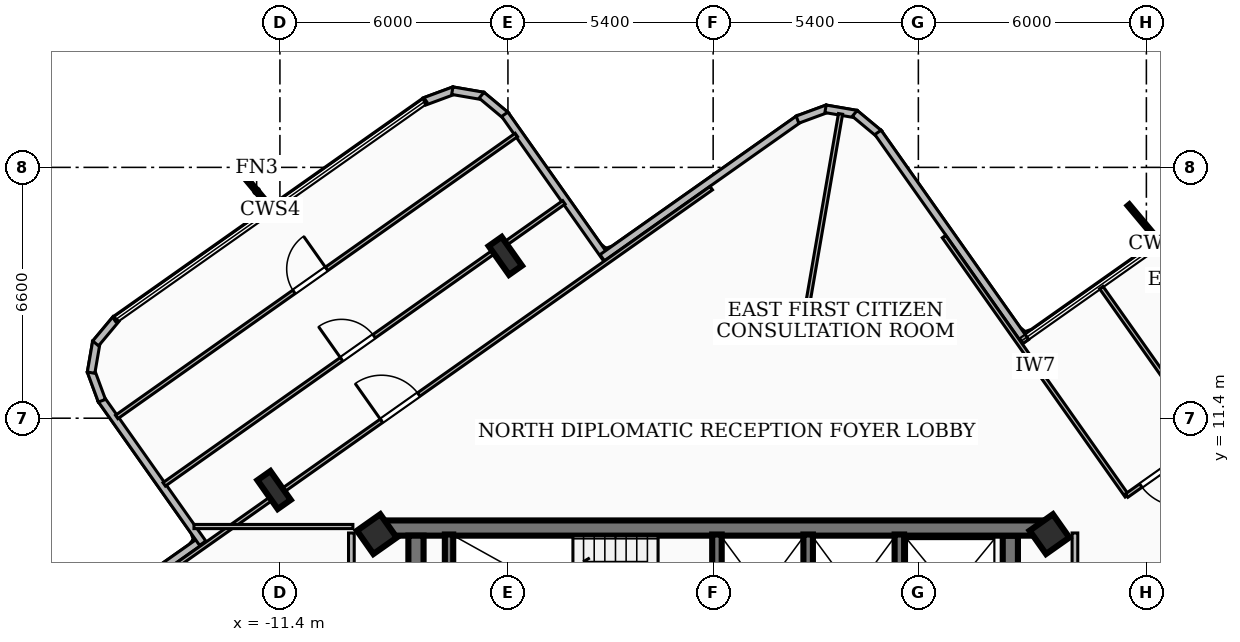
"""IFC4 building model, lengths in metres.
Left out: names, types, materials, properties, quantities, classifications, styles, units other than length and angle.
Written with IfcOpenShell. Run it as: python <this file> out.ifc"""

import sys

from ifc_helpers import new_model, si_unit, direction, frame, frame_2d, origin, origin_2d, place, context, subcontext, project, spatial, rectangle, i_section, extrude, element, fill, save


model = new_model("IFC4")
c1 = context("Model", 3, precision=1e-05, world=origin(), true_north=direction((0.0, 1.0)))
c2 = subcontext(c1, "Body", "Model", "MODEL_VIEW")
j1 = project(units=[si_unit("LENGTHUNIT", "METRE"), si_unit("PLANEANGLEUNIT", "RADIAN")], contexts=[c1])
p1 = place(None, origin())
s1 = spatial("IfcSite", under=j1, at=p1, CompositionType="ELEMENT")
p2 = place(p1, origin())
s2 = spatial("IfcBuilding", under=s1, at=p2, CompositionType="ELEMENT")
p3 = place(p2, frame((0.0, 0.0, 225.72)))
s3 = spatial("IfcBuildingStorey", under=s2, at=p3, CompositionType="ELEMENT", Elevation=225.72)
p4 = place(p3, frame((-8.78, 8.51, 0.0), z_axis=(0.0, 0.0, 1.0), x_axis=(1.0, 0.0, 0.0)))
e1 = element("IfcWall", 1, at=p4, inside=s3, PredefinedType="SHEAR", context=c2, shape_type="SweptSolid", body=[
    extrude(rectangle(XDim=17.56, YDim=0.4, at=frame_2d((8.78, 0.0))), origin(), (0.0, 0.0, 1.0), 3.14),
])
for number, where, z_axis, x_axis in (
    (2, (-7.82, 1.95, 0.0), (0.0, 0.0, 1.0), (0.0, 1.0, 0.0)),
    (3, (7.82, 8.31, 0.0), (0.0, 0.0, 1.0), (0.0, -1.0, 0.0)),
):
    element("IfcWall", number, at=place(p3, frame(where, z_axis=z_axis, x_axis=x_axis)), inside=s3, PredefinedType="SHEAR", context=c2, shape_type="SweptSolid", body=[
        extrude(rectangle(XDim=6.36, YDim=0.4, at=frame_2d((3.18, 0.0))), origin(), (0.0, 0.0, 1.0), 3.14),
    ])
p5 = place(p3, frame((-6.95, 5.28, 0.0), z_axis=(0.0, 0.0, 1.0), x_axis=(0.0, 1.0, 0.0)))
e4 = element("IfcWall", 4, at=p5, inside=s3, PredefinedType="SOLIDWALL", context=c2, shape_type="SweptSolid", body=[
    extrude(rectangle(XDim=3.06, YDim=0.22, at=frame_2d((1.53, 0.0))), origin(), (0.0, 0.0, 1.0), 3.14),
])
for number, where, z_axis, x_axis in (
    (5, (0.1, 5.3, 0.0), (0.0, 0.0, 1.0), (0.0, 1.0, 0.0)),
    (6, (2.5, 5.3, 0.0), (0.0, 0.0, 1.0), (0.0, 1.0, 0.0)),
    (7, (4.9, 5.3, 0.0), (0.0, 0.0, 1.0), (0.0, 1.0, 0.0)),
):
    element("IfcWall", number, at=place(p3, frame(where, z_axis=z_axis, x_axis=x_axis)), inside=s3, PredefinedType="SOLIDWALL", context=c2, shape_type="SweptSolid", body=[
        extrude(rectangle(XDim=3.04, YDim=0.25, at=frame_2d((1.52, 0.0))), origin(), (0.0, 0.0, 1.0), 3.14),
    ])
for number, where, z_axis, x_axis in (
    (8, (-8.85, 8.35, 0.0), (0.0, 0.0, 1.0), (0.817, 0.576, 0.0)),
    (9, (8.85, 8.35, 0.0), (0.0, 0.0, 1.0), (0.817, 0.576, 0.0)),
):
    element("IfcColumn", number, at=place(p3, frame(where, z_axis=z_axis, x_axis=x_axis)), inside=s3, PredefinedType="COLUMN", context=c2, shape_type="SweptSolid", body=[
        extrude(rectangle(XDim=0.75, YDim=0.75, at=origin_2d()), origin(), (0.0, 0.0, 1.0), 3.42),
    ])
for number, where, z_axis, x_axis in (
    (10, (-5.468, 15.671, 0.0), (0.0, 0.0, 1.0), (0.817, 0.576, 0.0)),
    (11, (-11.554, 9.51, 0.0), (0.0, 0.0, 1.0), (0.817, 0.576, 0.0)),
):
    element("IfcColumn", number, at=place(p3, frame(where, z_axis=z_axis, x_axis=x_axis)), inside=s3, PredefinedType="COLUMN", context=c2, shape_type="SweptSolid", body=[
        extrude(i_section(OverallWidth=0.418, OverallDepth=0.927, WebThickness=0.019, FlangeThickness=0.032, at=origin_2d()), origin(), (0.0, 0.0, 1.0), 3.42),
    ])
p6 = place(p3, frame((-18.921, 4.337, 0.0), z_axis=(0.0, 0.0, 1.0), x_axis=(0.817167578816, 0.576400163196, 0.0)))
e12 = element("IfcWall", 12, at=p6, inside=s3, PredefinedType="SOLIDWALL", context=c2, shape_type="SweptSolid", body=[
    extrude(rectangle(XDim=6.74, YDim=0.2, at=frame_2d((3.37, 0.0))), origin(), (0.0, 0.0, 1.0), 3.14),
])
p7 = place(p3, frame((-13.432, 8.111, 0.0), z_axis=(0.0, 0.0, 1.0), x_axis=(-0.576445639344, 0.817135499707, 0.0)))
e13 = element("IfcWall", 13, at=p7, inside=s3, PredefinedType="SOLIDWALL", context=c2, shape_type="SweptSolid", body=[
    extrude(rectangle(XDim=4.641, YDim=0.2, at=frame_2d((2.32, 0.0))), origin(), (0.0, 0.0, 1.0), 3.14),
])
p8 = place(p3, frame((-16.084, 11.86, 0.0), z_axis=(0.0, 0.0, 1.0), x_axis=(-0.346232030844, 0.938148911857, 0.0)))
e14 = element("IfcWall", 14, at=p8, inside=s3, PredefinedType="SOLIDWALL", context=c2, shape_type="SweptSolid", body=[
    extrude(rectangle(XDim=0.838, YDim=0.2, at=frame_2d((0.419, 0.0))), origin(), (0.0, 0.0, 1.0), 3.14),
])
p9 = place(p3, frame((-16.369, 12.598, 0.0), z_axis=(0.0, 0.0, 1.0), x_axis=(0.169332910212, 0.985558910223, 0.0)))
e15 = element("IfcWall", 15, at=p9, inside=s3, PredefinedType="SOLIDWALL", context=c2, shape_type="SweptSolid", body=[
    extrude(rectangle(XDim=0.826, YDim=0.2, at=frame_2d((0.413, 0.0))), origin(), (0.0, 0.0, 1.0), 3.14),
])
p10 = place(p3, frame((-16.249, 13.368, 0.0), z_axis=(0.0, 0.0, 1.0), x_axis=(0.641043819012, 0.76750428149, 0.0)))
e16 = element("IfcWall", 16, at=p10, inside=s3, PredefinedType="SOLIDWALL", context=c2, shape_type="SweptSolid", body=[
    extrude(rectangle(XDim=0.838, YDim=0.2, at=frame_2d((0.419, 0.0))), origin(), (0.0, 0.0, 1.0), 3.14),
])
p11 = place(p3, frame((-7.601, 19.732, 0.0), z_axis=(0.0, 0.0, 1.0), x_axis=(0.937664324164, 0.347542249504, 0.0)))
e17 = element("IfcWall", 17, at=p11, inside=s3, PredefinedType="SOLIDWALL", context=c2, shape_type="SweptSolid", body=[
    extrude(rectangle(XDim=0.837, YDim=0.2, at=frame_2d((0.419, 0.0))), origin(), (0.0, 0.0, 1.0), 3.14),
])
p12 = place(p3, frame((-6.864, 20.018, 0.0), z_axis=(0.0, 0.0, 1.0), x_axis=(0.985501046628, -0.16966934636, 0.0)))
e18 = element("IfcWall", 18, at=p12, inside=s3, PredefinedType="SOLIDWALL", context=c2, shape_type="SweptSolid", body=[
    extrude(rectangle(XDim=0.826, YDim=0.2, at=frame_2d((0.413, 0.0))), origin(), (0.0, 0.0, 1.0), 3.14),
])
p13 = place(p3, frame((-6.094, 19.898, 0.0), z_axis=(0.0, 0.0, 1.0), x_axis=(0.767647650908, -0.640872127694, 0.0)))
e19 = element("IfcWall", 19, at=p13, inside=s3, PredefinedType="SOLIDWALL", context=c2, shape_type="SweptSolid", body=[
    extrude(rectangle(XDim=0.838, YDim=0.2, at=frame_2d((0.419, 0.0))), origin(), (0.0, 0.0, 1.0), 3.14),
])
p14 = place(p3, frame((-5.484, 19.397, 0.0), z_axis=(0.0, 0.0, 1.0), x_axis=(0.576451897958, -0.817131084551, 0.0)))
e20 = element("IfcWall", 20, at=p14, inside=s3, PredefinedType="SOLIDWALL", context=c2, shape_type="SweptSolid", body=[
    extrude(rectangle(XDim=4.642, YDim=0.2, at=frame_2d((2.321, 0.0))), origin(), (0.0, 0.0, 1.0), 3.14),
])
p15 = place(p3, frame((-2.919, 15.623, 0.0), z_axis=(0.0, 0.0, 1.0), x_axis=(0.817050016192, 0.576566796686, 0.0)))
e21 = element("IfcWall", 21, at=p15, inside=s3, PredefinedType="SOLIDWALL", context=c2, shape_type="SweptSolid", body=[
    extrude(rectangle(XDim=6.341, YDim=0.2, at=frame_2d((3.17, 0.0))), origin(), (0.0, 0.0, 1.0), 3.14),
])
p16 = place(p3, frame((2.219, 19.256, 0.0), z_axis=(0.0, 0.0, 1.0), x_axis=(0.938243551417, 0.345975487894, 0.0)))
e22 = element("IfcWall", 22, at=p16, inside=s3, PredefinedType="SOLIDWALL", context=c2, shape_type="SweptSolid", body=[
    extrude(rectangle(XDim=0.838, YDim=0.2, at=frame_2d((0.419, 0.0))), origin(), (0.0, 0.0, 1.0), 3.14),
])
p17 = place(p3, frame((2.957, 19.541, 0.0), z_axis=(0.0, 0.0, 1.0), x_axis=(0.985466949497, -0.169867275979, 0.0)))
e23 = element("IfcWall", 23, at=p17, inside=s3, PredefinedType="SOLIDWALL", context=c2, shape_type="SweptSolid", body=[
    extrude(rectangle(XDim=0.825, YDim=0.2, at=frame_2d((0.413, 0.0))), origin(), (0.0, 0.0, 1.0), 3.14),
])
p18 = place(p3, frame((3.726, 19.421, 0.0), z_axis=(0.0, 0.0, 1.0), x_axis=(0.768698761673, -0.639610986305, 0.0)))
e24 = element("IfcWall", 24, at=p18, inside=s3, PredefinedType="SOLIDWALL", context=c2, shape_type="SweptSolid", body=[
    extrude(rectangle(XDim=0.838, YDim=0.2, at=frame_2d((0.419, 0.0))), origin(), (0.0, 0.0, 1.0), 3.14),
])
p19 = place(p3, frame((4.337, 18.921, 0.0), z_axis=(0.0, 0.0, 1.0), x_axis=(0.576400163196, -0.817167578816, 0.0)))
e25 = element("IfcWall", 25, at=p19, inside=s3, PredefinedType="SOLIDWALL", context=c2, shape_type="SweptSolid", body=[
    extrude(rectangle(XDim=6.74, YDim=0.2, at=frame_2d((3.37, 0.0))), origin(), (0.0, 0.0, 1.0), 3.14),
])
p20 = place(p3, frame((-9.52, 1.75, 0.0), z_axis=(0.0, 0.0, 1.0), x_axis=(0.0, 1.0, 0.0)))
e26 = element("IfcWall", 26, at=p20, inside=s3, PredefinedType="PARTITIONING", context=c2, shape_type="SweptSolid", body=[
    extrude(rectangle(XDim=6.63, YDim=0.15, at=frame_2d((3.315, 0.0))), origin(), (0.0, 0.0, 1.0), 3.14),
])
p21 = place(p3, frame((9.52, 1.75, 0.0), z_axis=(0.0, 0.0, 1.0), x_axis=(0.0, 1.0, 0.0)))
e27 = element("IfcWall", 27, at=p21, inside=s3, PredefinedType="PARTITIONING", context=c2, shape_type="SweptSolid", body=[
    extrude(rectangle(XDim=6.63, YDim=0.15, at=frame_2d((3.315, 0.0))), origin(), (0.0, 0.0, 1.0), 2.51),
])
p22 = place(p3, frame((-13.662, 8.55, 0.0), z_axis=(0.0, 0.0, 1.0), x_axis=(1.0, 0.0, 0.0)))
e28 = element("IfcWall", 28, at=p22, inside=s3, PredefinedType="PARTITIONING", context=c2, shape_type="SweptSolid", body=[
    extrude(rectangle(XDim=4.182, YDim=0.11, at=frame_2d((2.091, 0.0))), origin(), (0.0, 0.0, 1.0), 2.51),
])
p23 = place(p3, frame((2.338, 13.54, 0.0), z_axis=(0.0, 0.0, 1.0), x_axis=(0.1703339471, 0.9853863945, 0.0)))
e29 = element("IfcWall", 29, at=p23, inside=s3, PredefinedType="PARTITIONING", context=c2, shape_type="SweptSolid", body=[
    extrude(rectangle(XDim=5.954, YDim=0.11, at=frame_2d((2.977, 0.0))), origin(), (0.0, 0.0, 1.0), 3.14),
])
p24 = place(p3, frame((10.887, 9.357, 0.0), z_axis=(0.0, 0.0, 1.0), x_axis=(-0.576423728743, 0.817150956031, 0.0)))
e30 = element("IfcWall", 30, at=p24, inside=s3, PredefinedType="PARTITIONING", context=c2, shape_type="SweptSolid", body=[
    extrude(rectangle(XDim=8.35, YDim=0.11, at=frame_2d((4.175, 0.0))), origin(), (0.0, 0.0, 1.0), 2.51),
])
p25 = place(p3, frame((13.014, 10.869, 0.0), z_axis=(0.0, 0.0, 1.0), x_axis=(-0.817133808286, -0.576448036995, 0.0)))
e31 = element("IfcWall", 31, at=p25, inside=s3, PredefinedType="PARTITIONING", context=c2, shape_type="SweptSolid", body=[
    extrude(rectangle(XDim=2.609, YDim=0.11, at=frame_2d((1.304, 0.0))), origin(), (0.0, 0.0, 1.0), 3.14),
])
p26 = place(p25, frame((0.854, 0.0, 0.0)))
e32 = element("IfcOpeningElement", 32, at=p26, cuts=e31, PredefinedType="OPENING", context=c2, shape_type="SweptSolid", body=[
    extrude(rectangle(XDim=1.3, YDim=2.1, at=frame_2d((0.65, 1.05))), frame((0.0, 0.065, 0.0), z_axis=(0.0, -1.0, 0.0), x_axis=(1.0, 0.0, 0.0)), (0.0, 0.0, 1.0), 0.13),
])
p27 = place(p3, frame((10.215, 14.836, 0.0), z_axis=(0.0, 0.0, 1.0), x_axis=(0.576525296339, -0.817079300118, 0.0)))
e33 = element("IfcWall", 33, at=p27, inside=s3, PredefinedType="PARTITIONING", context=c2, shape_type="SweptSolid", body=[
    extrude(rectangle(XDim=12.87, YDim=0.11, at=frame_2d((6.435, 0.0))), origin(), (0.0, 0.0, 1.0), 2.51),
])
p28 = place(p27, frame((6.155, 0.0, 0.0)))
e34 = element("IfcOpeningElement", 34, at=p28, cuts=e33, PredefinedType="OPENING", context=c2, shape_type="SweptSolid", body=[
    extrude(rectangle(XDim=0.86, YDim=2.04, at=frame_2d((0.43, 1.02))), frame((0.0, 0.065, 0.0), z_axis=(0.0, -1.0, 0.0), x_axis=(1.0, 0.0, 0.0)), (0.0, 0.0, 1.0), 0.13),
])
p29 = place(p27, frame((4.955, 0.0, 0.0)))
e35 = element("IfcOpeningElement", 35, at=p29, cuts=e33, PredefinedType="OPENING", context=c2, shape_type="SweptSolid", body=[
    extrude(rectangle(XDim=0.86, YDim=2.04, at=frame_2d((0.43, 1.02))), frame((0.0, 0.065, 0.0), z_axis=(0.0, -1.0, 0.0), x_axis=(1.0, 0.0, 0.0)), (0.0, 0.0, 1.0), 0.13),
])
p30 = place(p3, frame((-16.752, 5.671, 0.0), z_axis=(0.0, 0.0, 1.0), x_axis=(0.81715881447, 0.576412588285, 0.0)))
e36 = element("IfcWall", 36, at=p30, inside=s3, PredefinedType="PARTITIONING", context=c2, shape_type="SweptSolid", body=[
    extrude(rectangle(XDim=20.44, YDim=0.11, at=frame_2d((10.22, 0.0))), origin(), (0.0, 0.0, 1.0), 2.51),
])
p31 = place(p30, frame((9.82, 0.0, 0.0)))
e37 = element("IfcOpeningElement", 37, at=p31, cuts=e36, PredefinedType="OPENING", context=c2, shape_type="SweptSolid", body=[
    extrude(rectangle(XDim=1.2, YDim=2.1, at=frame_2d((0.6, 1.05))), frame((0.0, 0.065, 0.0), z_axis=(0.0, -1.0, 0.0), x_axis=(1.0, 0.0, 0.0)), (0.0, 0.0, 1.0), 0.13),
])
p32 = place(p3, frame((-14.445, 9.66, 0.0), z_axis=(0.0, 0.0, 1.0), x_axis=(0.817137627016, 0.576442623784, 0.0)))
e38 = element("IfcWall", 38, at=p32, inside=s3, PredefinedType="PARTITIONING", context=c2, shape_type="SweptSolid", body=[
    extrude(rectangle(XDim=12.871, YDim=0.11, at=frame_2d((6.435, 0.0))), origin(), (0.0, 0.0, 1.0), 3.14),
])
p33 = place(p32, frame((5.71, 0.0, 0.0)))
e39 = element("IfcOpeningElement", 39, at=p33, cuts=e38, PredefinedType="OPENING", context=c2, shape_type="SweptSolid", body=[
    extrude(rectangle(XDim=1.05, YDim=2.08, at=frame_2d((0.525, 1.04))), frame((0.0, 0.065, 0.0), z_axis=(0.0, -1.0, 0.0), x_axis=(1.0, 0.0, 0.0)), (0.0, 0.0, 1.0), 0.13),
])
p34 = place(p3, frame((-15.695, 11.433, 0.0), z_axis=(0.0, 0.0, 1.0), x_axis=(0.817121348165, 0.576465699216, 0.0)))
e40 = element("IfcWall", 40, at=p34, inside=s3, PredefinedType="PARTITIONING", context=c2, shape_type="SweptSolid", body=[
    extrude(rectangle(XDim=12.87, YDim=0.11, at=frame_2d((6.435, 0.0))), origin(), (0.0, 0.0, 1.0), 3.14),
])
p35 = place(p34, frame((5.709, 0.0, 0.0)))
e41 = element("IfcOpeningElement", 41, at=p35, cuts=e40, PredefinedType="OPENING", context=c2, shape_type="SweptSolid", body=[
    extrude(rectangle(XDim=1.05, YDim=2.08, at=frame_2d((0.525, 1.04))), frame((0.0, 0.065, 0.0), z_axis=(0.0, -1.0, 0.0), x_axis=(1.0, 0.0, 0.0)), (0.0, 0.0, 1.0), 0.13),
])
p36 = place(p26, origin())
e42 = element("IfcDoor", 42, at=p36, inside=s3, OperationType="SINGLE_SWING_LEFT", PredefinedType="DOOR", context=c2, shape_type="SweptSolid", body=[
    extrude(rectangle(XDim=1.3, YDim=2.1, at=frame_2d((0.65, 1.05))), frame((0.0, 0.025, 0.0), z_axis=(0.0, -1.0, 0.0), x_axis=(1.0, 0.0, 0.0)), (0.0, 0.0, 1.0), 0.05),
])
fill(e32, e42)
p37 = place(p31, origin())
e43 = element("IfcDoor", 43, at=p37, inside=s3, OperationType="SINGLE_SWING_LEFT", PredefinedType="DOOR", context=c2, shape_type="SweptSolid", body=[
    extrude(rectangle(XDim=1.2, YDim=2.1, at=frame_2d((0.6, 1.05))), frame((0.0, 0.025, 0.0), z_axis=(0.0, -1.0, 0.0), x_axis=(1.0, 0.0, 0.0)), (0.0, 0.0, 1.0), 0.05),
])
fill(e37, e43)
p38 = place(p33, origin())
e44 = element("IfcDoor", 44, at=p38, inside=s3, OperationType="SINGLE_SWING_LEFT", PredefinedType="DOOR", context=c2, shape_type="SweptSolid", body=[
    extrude(rectangle(XDim=1.05, YDim=2.08, at=frame_2d((0.525, 1.04))), frame((0.0, 0.025, 0.0), z_axis=(0.0, -1.0, 0.0), x_axis=(1.0, 0.0, 0.0)), (0.0, 0.0, 1.0), 0.05),
])
fill(e39, e44)
p39 = place(p35, origin())
e45 = element("IfcDoor", 45, at=p39, inside=s3, OperationType="SINGLE_SWING_RIGHT", PredefinedType="DOOR", context=c2, shape_type="SweptSolid", body=[
    extrude(rectangle(XDim=1.05, YDim=2.08, at=frame_2d((0.525, 1.04))), frame((0.0, 0.025, 0.0), z_axis=(0.0, -1.0, 0.0), x_axis=(1.0, 0.0, 0.0)), (0.0, 0.0, 1.0), 0.05),
])
fill(e41, e45)
save(model, sys.argv[1])
